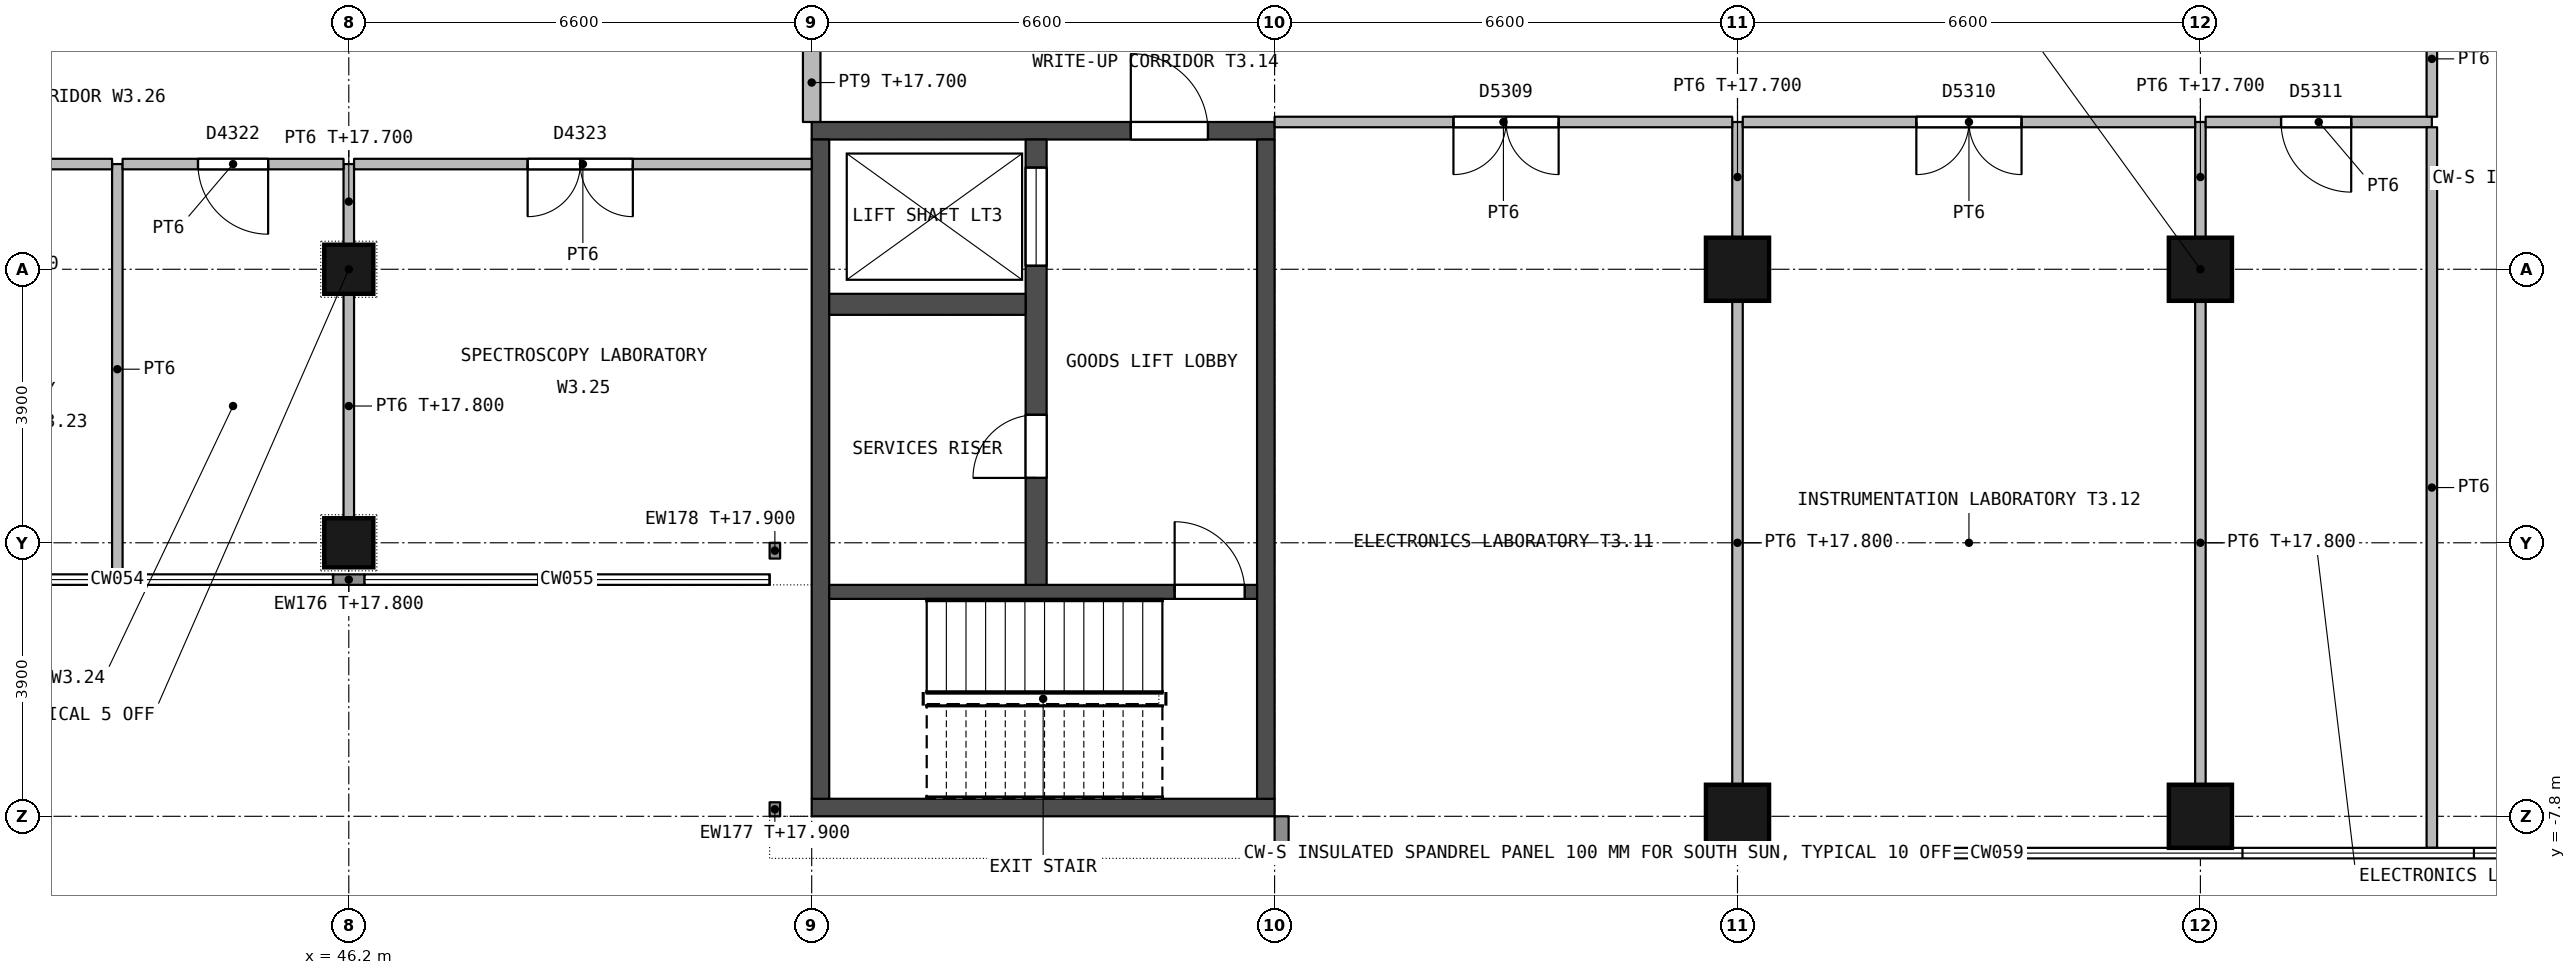
"""IFC4 building model, lengths in metres.
Left out: names, types, materials, properties, quantities, classifications, styles, units other than length and angle.
Written with IfcOpenShell. Run it as: python <this file> out.ifc"""

import sys

from ifc_helpers import new_model, si_unit, direction, frame, frame_2d, origin, origin_2d, place, context, subcontext, project, spatial, rectangle, extrude, element, fill, save


model = new_model("IFC4")
c1 = context("Model", 3, precision=1e-05, world=origin(), true_north=direction((0.0, 1.0)))
c2 = subcontext(c1, "Body", "Model", "MODEL_VIEW")
j1 = project(units=[si_unit("LENGTHUNIT", "METRE"), si_unit("PLANEANGLEUNIT", "RADIAN")], contexts=[c1])
p1 = place(None, origin())
s1 = spatial("IfcSite", under=j1, at=p1, CompositionType="ELEMENT")
p2 = place(p1, origin())
s2 = spatial("IfcBuilding", under=s1, at=p2, CompositionType="ELEMENT")
p3 = place(p2, frame((0.0, 0.0, 14.4)))
s3 = spatial("IfcBuildingStorey", under=s2, at=p3, CompositionType="ELEMENT", Elevation=14.4)
p4 = place(p3, frame((46.2, 0.0, 0.0), z_axis=(0.0, 0.0, 1.0), x_axis=(1.0, 0.0, 0.0)))
e1 = element("IfcColumn", 1, at=p4, inside=s3, PredefinedType="COLUMN", context=c2, shape_type="SweptSolid", body=[
    extrude(rectangle(XDim=0.7, YDim=0.7, at=origin_2d()), origin(), (0.0, 0.0, 1.0), 4.5),
])
for number, where, z_axis, x_axis in (
    (2, (66.0, -7.8, 0.0), (0.0, 0.0, 1.0), (1.0, 0.0, 0.0)),
    (3, (66.0, 0.0, 0.0), (0.0, 0.0, 1.0), (1.0, 0.0, 0.0)),
    (4, (72.6, -7.8, 0.0), (0.0, 0.0, 1.0), (1.0, 0.0, 0.0)),
    (5, (72.6, 0.0, 0.0), (0.0, 0.0, 1.0), (1.0, 0.0, 0.0)),
):
    element("IfcColumn", number, at=place(p3, frame(where, z_axis=z_axis, x_axis=x_axis)), inside=s3, PredefinedType="COLUMN", context=c2, shape_type="SweptSolid", body=[
        extrude(rectangle(XDim=0.9, YDim=0.9, at=origin_2d()), origin(), (0.0, 0.0, 1.0), 4.5),
    ])
p5 = place(p3, frame((46.2, -3.9, 0.0), z_axis=(0.0, 0.0, 1.0), x_axis=(1.0, 0.0, 0.0)))
e6 = element("IfcColumn", 6, at=p5, inside=s3, PredefinedType="COLUMN", context=c2, shape_type="SweptSolid", body=[
    extrude(rectangle(XDim=0.7, YDim=0.7, at=origin_2d()), origin(), (0.0, 0.0, 1.0), 4.5),
])
p6 = place(p3, frame((59.4, 1.975, 0.0), z_axis=(0.0, 0.0, 1.0), x_axis=(-1.0, 0.0, 0.0)))
e7 = element("IfcWall", 7, at=p6, inside=s3, PredefinedType="SHEAR", context=c2, shape_type="SweptSolid", body=[
    extrude(rectangle(XDim=6.6, YDim=0.25, at=frame_2d((3.3, 0.0))), origin(), (0.0, 0.0, 1.0), 4.2),
])
p7 = place(p6, frame((0.95, 0.0, 0.0)))
e8 = element("IfcOpeningElement", 8, at=p7, cuts=e7, PredefinedType="OPENING", context=c2, shape_type="SweptSolid", body=[
    extrude(rectangle(XDim=1.1, YDim=2.1, at=frame_2d((0.55, 1.05))), frame((0.0, 0.135, 0.0), z_axis=(0.0, -1.0, 0.0), x_axis=(1.0, 0.0, 0.0)), (0.0, 0.0, 1.0), 0.27),
])
p8 = place(p3, frame((59.4, -7.675, 0.0), z_axis=(0.0, 0.0, 1.0), x_axis=(-1.0, 0.0, 0.0)))
e9 = element("IfcWall", 9, at=p8, inside=s3, PredefinedType="SHEAR", context=c2, shape_type="SweptSolid", body=[
    extrude(rectangle(XDim=6.6, YDim=0.25, at=frame_2d((3.3, 0.0))), origin(), (0.0, 0.0, 1.0), 4.2),
])
for number, where, z_axis, x_axis in (
    (10, (59.275, 1.85, 0.0), (0.0, 0.0, 1.0), (0.0, -1.0, 0.0)),
    (11, (52.925, 1.85, 0.0), (0.0, 0.0, 1.0), (0.0, -1.0, 0.0)),
):
    element("IfcWall", number, at=place(p3, frame(where, z_axis=z_axis, x_axis=x_axis)), inside=s3, PredefinedType="SHEAR", context=c2, shape_type="SweptSolid", body=[
        extrude(rectangle(XDim=9.4, YDim=0.25, at=frame_2d((4.7, 0.0))), origin(), (0.0, 0.0, 1.0), 4.2),
    ])
p9 = place(p3, frame((59.15, -4.6, 0.0), z_axis=(0.0, 0.0, 1.0), x_axis=(-1.0, 0.0, 0.0)))
e12 = element("IfcWall", 12, at=p9, inside=s3, PredefinedType="SHEAR", context=c2, shape_type="SweptSolid", body=[
    extrude(rectangle(XDim=6.1, YDim=0.2, at=frame_2d((3.05, 0.0))), origin(), (0.0, 0.0, 1.0), 4.2),
])
p10 = place(p9, frame((0.175, 0.0, 0.0)))
e13 = element("IfcOpeningElement", 13, at=p10, cuts=e12, PredefinedType="OPENING", context=c2, shape_type="SweptSolid", body=[
    extrude(rectangle(XDim=1.0, YDim=2.1, at=frame_2d((0.5, 1.05))), frame((0.0, 0.11, 0.0), z_axis=(0.0, -1.0, 0.0), x_axis=(1.0, 0.0, 0.0)), (0.0, 0.0, 1.0), 0.22),
])
p11 = place(p3, frame((56.0, 1.85, 0.0), z_axis=(0.0, 0.0, 1.0), x_axis=(0.0, -1.0, 0.0)))
e14 = element("IfcWall", 14, at=p11, inside=s3, PredefinedType="SHEAR", context=c2, shape_type="SweptSolid", body=[
    extrude(rectangle(XDim=6.35, YDim=0.3, at=frame_2d((3.175, 0.0))), origin(), (0.0, 0.0, 1.0), 4.2),
])
p12 = place(p11, frame((3.925, 0.0, 0.0)))
e15 = element("IfcOpeningElement", 15, at=p12, cuts=e14, PredefinedType="OPENING", context=c2, shape_type="SweptSolid", body=[
    extrude(rectangle(XDim=0.9, YDim=2.1, at=frame_2d((0.45, 1.05))), frame((0.0, 0.16, 0.0), z_axis=(0.0, -1.0, 0.0), x_axis=(1.0, 0.0, 0.0)), (0.0, 0.0, 1.0), 0.32),
])
p13 = place(p11, frame((0.4, 0.0, 0.0)))
e16 = element("IfcOpeningElement", 16, at=p13, cuts=e14, PredefinedType="OPENING", context=c2, shape_type="SweptSolid", body=[
    extrude(rectangle(XDim=1.4, YDim=2.4, at=frame_2d((0.7, 1.2))), frame((0.0, 0.16, 0.0), z_axis=(0.0, -1.0, 0.0), x_axis=(1.0, 0.0, 0.0)), (0.0, 0.0, 1.0), 0.32),
])
p14 = place(p3, frame((55.85, -0.5, 0.0), z_axis=(0.0, 0.0, 1.0), x_axis=(-1.0, 0.0, 0.0)))
e17 = element("IfcWall", 17, at=p14, inside=s3, PredefinedType="SHEAR", context=c2, shape_type="SweptSolid", body=[
    extrude(rectangle(XDim=2.8, YDim=0.3, at=frame_2d((1.4, 0.0))), origin(), (0.0, 0.0, 1.0), 4.2),
])
p15 = place(p3, frame((46.425, -4.425, 0.0), z_axis=(0.0, 0.0, 1.0), x_axis=(-1.0, 0.0, 0.0)))
e18 = element("IfcWall", 18, at=p15, inside=s3, PredefinedType="STANDARD", context=c2, shape_type="SweptSolid", body=[
    extrude(rectangle(XDim=0.45, YDim=0.15, at=frame_2d((0.225, 0.0))), origin(), (0.0, 0.0, 1.0), 3.4),
])
p16 = place(p3, frame((59.5, -7.8, 0.0), z_axis=(0.0, 0.0, 1.0), x_axis=(0.0, -1.0, 0.0)))
e19 = element("IfcWall", 19, at=p16, inside=s3, PredefinedType="STANDARD", context=c2, shape_type="SweptSolid", body=[
    extrude(rectangle(XDim=0.6, YDim=0.2, at=frame_2d((0.3, 0.0))), origin(), (0.0, 0.0, 1.0), 3.5),
])
p17 = place(p3, frame((52.275, -7.8, 0.0), z_axis=(0.0, 0.0, 1.0), x_axis=(0.0, 1.0, 0.0)))
e20 = element("IfcWall", 20, at=p17, inside=s3, PredefinedType="STANDARD", context=c2, shape_type="SweptSolid", body=[
    extrude(rectangle(XDim=0.2, YDim=0.15, at=frame_2d((0.1, 0.0))), origin(), (0.0, 0.0, 1.0), 3.5),
])
p18 = place(p3, frame((52.275, -4.125, 0.0), z_axis=(0.0, 0.0, 1.0), x_axis=(0.0, 1.0, 0.0)))
e21 = element("IfcWall", 21, at=p18, inside=s3, PredefinedType="STANDARD", context=c2, shape_type="SweptSolid", body=[
    extrude(rectangle(XDim=0.225, YDim=0.15, at=frame_2d((0.113, 0.0))), origin(), (0.0, 0.0, 1.0), 3.5),
])
p19 = place(p3, frame((42.9, -4.35, 0.0), z_axis=(0.0, 0.0, 1.0), x_axis=(0.0, 1.0, 0.0)))
e22 = element("IfcWall", 22, at=p19, inside=s3, PredefinedType="PARTITIONING", context=c2, shape_type="SweptSolid", body=[
    extrude(rectangle(XDim=5.85, YDim=0.15, at=frame_2d((2.925, 0.0))), origin(), (0.0, 0.0, 1.0), 4.2),
])
p20 = place(p3, frame((42.825, 1.5, 0.0), z_axis=(0.0, 0.0, 1.0), x_axis=(-1.0, 0.0, 0.0)))
e23 = element("IfcWall", 23, at=p20, inside=s3, PredefinedType="PARTITIONING", context=c2, shape_type="SweptSolid", body=[
    extrude(rectangle(XDim=3.15, YDim=0.15, at=frame_2d((1.575, 0.0))), origin(), (0.0, 0.0, 1.0), 4.2),
])
p21 = place(p20, frame((1.075, 0.0, 0.0)))
e24 = element("IfcOpeningElement", 24, at=p21, cuts=e23, PredefinedType="OPENING", context=c2, shape_type="SweptSolid", body=[
    extrude(rectangle(XDim=1.0, YDim=2.1, at=frame_2d((0.5, 1.05))), frame((0.0, 0.085, 0.0), z_axis=(0.0, -1.0, 0.0), x_axis=(1.0, 0.0, 0.0)), (0.0, 0.0, 1.0), 0.17),
])
p22 = place(p3, frame((46.2, -3.55, 0.0), z_axis=(0.0, 0.0, 1.0), x_axis=(0.0, 1.0, 0.0)))
e25 = element("IfcWall", 25, at=p22, inside=s3, PredefinedType="PARTITIONING", context=c2, shape_type="SweptSolid", body=[
    extrude(rectangle(XDim=3.2, YDim=0.15, at=frame_2d((1.6, 0.0))), origin(), (0.0, 0.0, 1.0), 3.4),
])
p23 = place(p3, frame((46.2, 0.35, 0.0), z_axis=(0.0, 0.0, 1.0), x_axis=(0.0, 1.0, 0.0)))
e26 = element("IfcWall", 26, at=p23, inside=s3, PredefinedType="PARTITIONING", context=c2, shape_type="SweptSolid", body=[
    extrude(rectangle(XDim=1.15, YDim=0.15, at=frame_2d((0.575, 0.0))), origin(), (0.0, 0.0, 1.0), 3.3),
])
p24 = place(p3, frame((46.125, 1.5, 0.0), z_axis=(0.0, 0.0, 1.0), x_axis=(-1.0, 0.0, 0.0)))
e27 = element("IfcWall", 27, at=p24, inside=s3, PredefinedType="PARTITIONING", context=c2, shape_type="SweptSolid", body=[
    extrude(rectangle(XDim=3.15, YDim=0.15, at=frame_2d((1.575, 0.0))), origin(), (0.0, 0.0, 1.0), 4.2),
])
p25 = place(p24, frame((1.075, 0.0, 0.0)))
e28 = element("IfcOpeningElement", 28, at=p25, cuts=e27, PredefinedType="OPENING", context=c2, shape_type="SweptSolid", body=[
    extrude(rectangle(XDim=1.0, YDim=2.1, at=frame_2d((0.5, 1.05))), frame((0.0, 0.085, 0.0), z_axis=(0.0, -1.0, 0.0), x_axis=(1.0, 0.0, 0.0)), (0.0, 0.0, 1.0), 0.17),
])
p26 = place(p3, frame((52.8, 1.5, 0.0), z_axis=(0.0, 0.0, 1.0), x_axis=(-1.0, 0.0, 0.0)))
e29 = element("IfcWall", 29, at=p26, inside=s3, PredefinedType="PARTITIONING", context=c2, shape_type="SweptSolid", body=[
    extrude(rectangle(XDim=6.525, YDim=0.15, at=frame_2d((3.262, 0.0))), origin(), (0.0, 0.0, 1.0), 4.2),
])
p27 = place(p26, frame((2.55, 0.0, 0.0)))
e30 = element("IfcOpeningElement", 30, at=p27, cuts=e29, PredefinedType="OPENING", context=c2, shape_type="SweptSolid", body=[
    extrude(rectangle(XDim=1.5, YDim=2.1, at=frame_2d((0.75, 1.05))), frame((0.0, 0.085, 0.0), z_axis=(0.0, -1.0, 0.0), x_axis=(1.0, 0.0, 0.0)), (0.0, 0.0, 1.0), 0.17),
])
p28 = place(p3, frame((52.8, 2.1, 0.0), z_axis=(0.0, 0.0, 1.0), x_axis=(0.0, 1.0, 0.0)))
e31 = element("IfcWall", 31, at=p28, inside=s3, PredefinedType="PARTITIONING", context=c2, shape_type="SweptSolid", body=[
    extrude(rectangle(XDim=1.125, YDim=0.25, at=frame_2d((0.562, 0.0))), origin(), (0.0, 0.0, 1.0), 3.3),
])
p29 = place(p3, frame((66.0, -7.35, 0.0), z_axis=(0.0, 0.0, 1.0), x_axis=(0.0, 1.0, 0.0)))
e32 = element("IfcWall", 32, at=p29, inside=s3, PredefinedType="PARTITIONING", context=c2, shape_type="SweptSolid", body=[
    extrude(rectangle(XDim=6.9, YDim=0.15, at=frame_2d((3.45, 0.0))), origin(), (0.0, 0.0, 1.0), 3.4),
])
p30 = place(p3, frame((66.0, 0.45, 0.0), z_axis=(0.0, 0.0, 1.0), x_axis=(0.0, 1.0, 0.0)))
e33 = element("IfcWall", 33, at=p30, inside=s3, PredefinedType="PARTITIONING", context=c2, shape_type="SweptSolid", body=[
    extrude(rectangle(XDim=1.65, YDim=0.15, at=frame_2d((0.825, 0.0))), origin(), (0.0, 0.0, 1.0), 3.3),
])
p31 = place(p3, frame((65.925, 2.1, 0.0), z_axis=(0.0, 0.0, 1.0), x_axis=(-1.0, 0.0, 0.0)))
e34 = element("IfcWall", 34, at=p31, inside=s3, PredefinedType="PARTITIONING", context=c2, shape_type="SweptSolid", body=[
    extrude(rectangle(XDim=6.525, YDim=0.15, at=frame_2d((3.262, 0.0))), origin(), (0.0, 0.0, 1.0), 4.2),
])
p32 = place(p31, frame((2.475, 0.0, 0.0)))
e35 = element("IfcOpeningElement", 35, at=p32, cuts=e34, PredefinedType="OPENING", context=c2, shape_type="SweptSolid", body=[
    extrude(rectangle(XDim=1.5, YDim=2.1, at=frame_2d((0.75, 1.05))), frame((0.0, 0.085, 0.0), z_axis=(0.0, -1.0, 0.0), x_axis=(1.0, 0.0, 0.0)), (0.0, 0.0, 1.0), 0.17),
])
p33 = place(p3, frame((72.6, -7.35, 0.0), z_axis=(0.0, 0.0, 1.0), x_axis=(0.0, 1.0, 0.0)))
e36 = element("IfcWall", 36, at=p33, inside=s3, PredefinedType="PARTITIONING", context=c2, shape_type="SweptSolid", body=[
    extrude(rectangle(XDim=6.9, YDim=0.15, at=frame_2d((3.45, 0.0))), origin(), (0.0, 0.0, 1.0), 3.4),
])
p34 = place(p3, frame((72.6, 0.45, 0.0), z_axis=(0.0, 0.0, 1.0), x_axis=(0.0, 1.0, 0.0)))
e37 = element("IfcWall", 37, at=p34, inside=s3, PredefinedType="PARTITIONING", context=c2, shape_type="SweptSolid", body=[
    extrude(rectangle(XDim=1.65, YDim=0.15, at=frame_2d((0.825, 0.0))), origin(), (0.0, 0.0, 1.0), 3.3),
])
p35 = place(p3, frame((72.525, 2.1, 0.0), z_axis=(0.0, 0.0, 1.0), x_axis=(-1.0, 0.0, 0.0)))
e38 = element("IfcWall", 38, at=p35, inside=s3, PredefinedType="PARTITIONING", context=c2, shape_type="SweptSolid", body=[
    extrude(rectangle(XDim=6.45, YDim=0.15, at=frame_2d((3.225, 0.0))), origin(), (0.0, 0.0, 1.0), 4.2),
])
p36 = place(p35, frame((2.475, 0.0, 0.0)))
e39 = element("IfcOpeningElement", 39, at=p36, cuts=e38, PredefinedType="OPENING", context=c2, shape_type="SweptSolid", body=[
    extrude(rectangle(XDim=1.5, YDim=2.1, at=frame_2d((0.75, 1.05))), frame((0.0, 0.085, 0.0), z_axis=(0.0, -1.0, 0.0), x_axis=(1.0, 0.0, 0.0)), (0.0, 0.0, 1.0), 0.17),
])
p37 = place(p3, frame((75.9, 2.1, 0.0), z_axis=(0.0, 0.0, 1.0), x_axis=(-1.0, 0.0, 0.0)))
e40 = element("IfcWall", 40, at=p37, inside=s3, PredefinedType="PARTITIONING", context=c2, shape_type="SweptSolid", body=[
    extrude(rectangle(XDim=3.225, YDim=0.15, at=frame_2d((1.612, 0.0))), origin(), (0.0, 0.0, 1.0), 4.2),
])
p38 = place(p37, frame((1.15, 0.0, 0.0)))
e41 = element("IfcOpeningElement", 41, at=p38, cuts=e40, PredefinedType="OPENING", context=c2, shape_type="SweptSolid", body=[
    extrude(rectangle(XDim=1.0, YDim=2.1, at=frame_2d((0.5, 1.05))), frame((0.0, 0.085, 0.0), z_axis=(0.0, -1.0, 0.0), x_axis=(1.0, 0.0, 0.0)), (0.0, 0.0, 1.0), 0.17),
])
p39 = place(p3, frame((75.9, -8.25, 0.0), z_axis=(0.0, 0.0, 1.0), x_axis=(0.0, 1.0, 0.0)))
e42 = element("IfcWall", 42, at=p39, inside=s3, PredefinedType="PARTITIONING", context=c2, shape_type="SweptSolid", body=[
    extrude(rectangle(XDim=10.275, YDim=0.15, at=frame_2d((5.137, 0.0))), origin(), (0.0, 0.0, 1.0), 4.2),
])
p40 = place(p3, frame((75.9, 2.175, 0.0), z_axis=(0.0, 0.0, 1.0), x_axis=(0.0, 1.0, 0.0)))
e43 = element("IfcWall", 43, at=p40, inside=s3, PredefinedType="PARTITIONING", context=c2, shape_type="SweptSolid", body=[
    extrude(rectangle(XDim=1.65, YDim=0.15, at=frame_2d((0.825, 0.0))), origin(), (0.0, 0.0, 1.0), 4.2),
])
p41 = place(p12, origin())
e44 = element("IfcDoor", 44, at=p41, inside=s3, OperationType="SINGLE_SWING_RIGHT", PredefinedType="DOOR", context=c2, shape_type="SweptSolid", body=[
    extrude(rectangle(XDim=0.9, YDim=2.1, at=frame_2d((0.45, 1.05))), frame((0.0, 0.025, 0.0), z_axis=(0.0, -1.0, 0.0), x_axis=(1.0, 0.0, 0.0)), (0.0, 0.0, 1.0), 0.05),
])
fill(e15, e44)
p42 = place(p7, origin())
e45 = element("IfcDoor", 45, at=p42, inside=s3, OperationType="SINGLE_SWING_RIGHT", PredefinedType="DOOR", context=c2, shape_type="SweptSolid", body=[
    extrude(rectangle(XDim=1.1, YDim=2.1, at=frame_2d((0.55, 1.05))), frame((0.0, 0.025, 0.0), z_axis=(0.0, -1.0, 0.0), x_axis=(1.0, 0.0, 0.0)), (0.0, 0.0, 1.0), 0.05),
])
fill(e8, e45)
p43 = place(p10, origin())
e46 = element("IfcDoor", 46, at=p43, inside=s3, OperationType="SINGLE_SWING_RIGHT", PredefinedType="DOOR", context=c2, shape_type="SweptSolid", body=[
    extrude(rectangle(XDim=1.0, YDim=2.1, at=frame_2d((0.5, 1.05))), frame((0.0, 0.025, 0.0), z_axis=(0.0, -1.0, 0.0), x_axis=(1.0, 0.0, 0.0)), (0.0, 0.0, 1.0), 0.05),
])
fill(e13, e46)
p44 = place(p13, origin())
e47 = element("IfcDoor", 47, at=p44, inside=s3, OperationType="DOUBLE_DOOR_SLIDING", PredefinedType="NOTDEFINED", context=c2, shape_type="SweptSolid", body=[
    extrude(rectangle(XDim=1.4, YDim=2.4, at=frame_2d((0.7, 1.2))), frame((0.0, 0.025, 0.0), z_axis=(0.0, -1.0, 0.0), x_axis=(1.0, 0.0, 0.0)), (0.0, 0.0, 1.0), 0.05),
])
fill(e16, e47)
p45 = place(p25, origin())
e48 = element("IfcDoor", 48, at=p45, inside=s3, OperationType="SINGLE_SWING_LEFT", PredefinedType="DOOR", context=c2, shape_type="SweptSolid", body=[
    extrude(rectangle(XDim=1.0, YDim=2.1, at=frame_2d((0.5, 1.05))), frame((0.0, 0.027, 0.0), z_axis=(0.0, -1.0, 0.0), x_axis=(1.0, 0.0, 0.0)), (0.0, 0.0, 1.0), 0.054),
])
fill(e28, e48)
p46 = place(p27, origin())
e49 = element("IfcDoor", 49, at=p46, inside=s3, OperationType="DOUBLE_DOOR_SINGLE_SWING", PredefinedType="DOOR", context=c2, shape_type="SweptSolid", body=[
    extrude(rectangle(XDim=1.5, YDim=2.1, at=frame_2d((0.75, 1.05))), frame((0.0, 0.027, 0.0), z_axis=(0.0, -1.0, 0.0), x_axis=(1.0, 0.0, 0.0)), (0.0, 0.0, 1.0), 0.054),
])
fill(e30, e49)
p47 = place(p32, origin())
e50 = element("IfcDoor", 50, at=p47, inside=s3, OperationType="DOUBLE_DOOR_SINGLE_SWING", PredefinedType="DOOR", context=c2, shape_type="SweptSolid", body=[
    extrude(rectangle(XDim=1.5, YDim=2.1, at=frame_2d((0.75, 1.05))), frame((0.0, 0.027, 0.0), z_axis=(0.0, -1.0, 0.0), x_axis=(1.0, 0.0, 0.0)), (0.0, 0.0, 1.0), 0.054),
])
fill(e35, e50)
p48 = place(p36, origin())
e51 = element("IfcDoor", 51, at=p48, inside=s3, OperationType="DOUBLE_DOOR_SINGLE_SWING", PredefinedType="DOOR", context=c2, shape_type="SweptSolid", body=[
    extrude(rectangle(XDim=1.5, YDim=2.1, at=frame_2d((0.75, 1.05))), frame((0.0, 0.027, 0.0), z_axis=(0.0, -1.0, 0.0), x_axis=(1.0, 0.0, 0.0)), (0.0, 0.0, 1.0), 0.054),
])
fill(e39, e51)
p49 = place(p38, origin())
e52 = element("IfcDoor", 52, at=p49, inside=s3, OperationType="SINGLE_SWING_LEFT", PredefinedType="DOOR", context=c2, shape_type="SweptSolid", body=[
    extrude(rectangle(XDim=1.0, YDim=2.1, at=frame_2d((0.5, 1.05))), frame((0.0, 0.027, 0.0), z_axis=(0.0, -1.0, 0.0), x_axis=(1.0, 0.0, 0.0)), (0.0, 0.0, 1.0), 0.054),
])
fill(e41, e52)
save(model, sys.argv[1])
